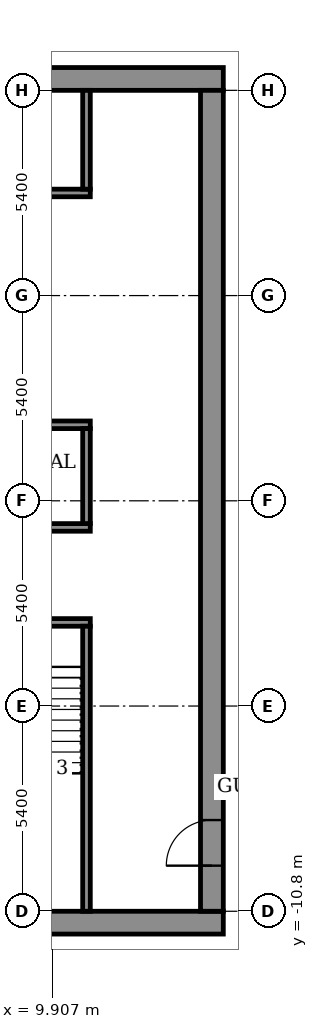
"""IFC4 building model, lengths in metres.
Left out: names, types, materials, properties, quantities, classifications, styles, units other than length and angle.
Written with IfcOpenShell. Run it as: python <this file> out.ifc"""

import sys

from ifc_helpers import new_model, si_unit, direction, frame, frame_2d, origin, place, context, subcontext, project, spatial, rectangle, extrude, element, fill, save


model = new_model("IFC4")
c1 = context("Model", 3, precision=1e-05, world=origin(), true_north=direction((0.0, 1.0)))
c2 = subcontext(c1, "Body", "Model", "MODEL_VIEW")
j1 = project(units=[si_unit("LENGTHUNIT", "METRE"), si_unit("PLANEANGLEUNIT", "RADIAN")], contexts=[c1])
p1 = place(None, origin())
s1 = spatial("IfcSite", under=j1, at=p1, CompositionType="ELEMENT")
p2 = place(p1, origin())
s2 = spatial("IfcBuilding", under=s1, at=p2, CompositionType="ELEMENT")
p3 = place(p2, frame((0.0, 0.0, 313.3)))
s3 = spatial("IfcBuildingStorey", under=s2, at=p3, CompositionType="ELEMENT", Elevation=313.3)
for number, where, z_axis, x_axis in (
    (1, (-14.4, -11.1, 0.0), (0.0, 0.0, 1.0), (1.0, 0.0, 0.0)),
    (2, (-14.4, 11.1, 0.0), (0.0, 0.0, 1.0), (1.0, 0.0, 0.0)),
):
    element("IfcWall", number, at=place(p3, frame(where, z_axis=z_axis, x_axis=x_axis)), inside=s3, PredefinedType="SHEAR", context=c2, shape_type="SweptSolid", body=[
        extrude(rectangle(XDim=28.8, YDim=0.6, at=frame_2d((14.4, 0.0))), origin(), (0.0, 0.0, 1.0), 3.6),
    ])
p4 = place(p3, frame((14.1, -10.8, 0.0), z_axis=(0.0, 0.0, 1.0), x_axis=(0.0, 1.0, 0.0)))
e3 = element("IfcWall", 3, at=p4, inside=s3, PredefinedType="SHEAR", context=c2, shape_type="SweptSolid", body=[
    extrude(rectangle(XDim=21.6, YDim=0.6, at=frame_2d((10.8, 0.0))), origin(), (0.0, 0.0, 1.0), 3.6),
])
p5 = place(p4, frame((1.2, 0.0, 0.0)))
e4 = element("IfcOpeningElement", 4, at=p5, cuts=e3, PredefinedType="OPENING", context=c2, shape_type="SweptSolid", body=[
    extrude(rectangle(XDim=1.2, YDim=2.1, at=frame_2d((0.6, 1.05))), frame((0.0, 0.31, 0.0), z_axis=(0.0, -1.0, 0.0), x_axis=(1.0, 0.0, 0.0)), (0.0, 0.0, 1.0), 0.62),
])
p6 = place(p3, frame((-10.9, -3.2, 0.0), z_axis=(0.0, 0.0, 1.0), x_axis=(1.0, 0.0, 0.0)))
e5 = element("IfcWall", 5, at=p6, inside=s3, PredefinedType="SHEAR", context=c2, shape_type="SweptSolid", body=[
    extrude(rectangle(XDim=21.8, YDim=0.2, at=frame_2d((10.9, 0.0))), origin(), (0.0, 0.0, 1.0), 3.05),
])
p7 = place(p6, frame((1.075, 0.0, 0.0)))
e6 = element("IfcOpeningElement", 6, at=p7, cuts=e5, PredefinedType="OPENING", context=c2, shape_type="SweptSolid", body=[
    extrude(rectangle(XDim=1.1, YDim=2.1, at=frame_2d((0.55, 1.05))), frame((0.0, 0.11, 0.0), z_axis=(0.0, -1.0, 0.0), x_axis=(1.0, 0.0, 0.0)), (0.0, 0.0, 1.0), 0.22),
])
p8 = place(p6, frame((10.325, 0.0, 0.0)))
e7 = element("IfcOpeningElement", 7, at=p8, cuts=e5, PredefinedType="OPENING", context=c2, shape_type="SweptSolid", body=[
    extrude(rectangle(XDim=1.1, YDim=2.1, at=frame_2d((0.55, 1.05))), frame((0.0, 0.11, 0.0), z_axis=(0.0, -1.0, 0.0), x_axis=(1.0, 0.0, 0.0)), (0.0, 0.0, 1.0), 0.22),
])
p9 = place(p6, frame((19.625, 0.0, 0.0)))
e8 = element("IfcOpeningElement", 8, at=p9, cuts=e5, PredefinedType="OPENING", context=c2, shape_type="SweptSolid", body=[
    extrude(rectangle(XDim=1.1, YDim=2.1, at=frame_2d((0.55, 1.05))), frame((0.0, 0.11, 0.0), z_axis=(0.0, -1.0, 0.0), x_axis=(1.0, 0.0, 0.0)), (0.0, 0.0, 1.0), 0.22),
])
p10 = place(p6, frame((5.7, 0.0, 0.0)))
e9 = element("IfcOpeningElement", 9, at=p10, cuts=e5, PredefinedType="OPENING", context=c2, shape_type="SweptSolid", body=[
    extrude(rectangle(XDim=1.1, YDim=2.1, at=frame_2d((0.55, 1.05))), frame((0.0, 0.11, 0.0), z_axis=(0.0, -1.0, 0.0), x_axis=(1.0, 0.0, 0.0)), (0.0, 0.0, 1.0), 0.22),
])
p11 = place(p6, frame((14.975, 0.0, 0.0)))
e10 = element("IfcOpeningElement", 10, at=p11, cuts=e5, PredefinedType="OPENING", context=c2, shape_type="SweptSolid", body=[
    extrude(rectangle(XDim=1.1, YDim=2.1, at=frame_2d((0.55, 1.05))), frame((0.0, 0.11, 0.0), z_axis=(0.0, -1.0, 0.0), x_axis=(1.0, 0.0, 0.0)), (0.0, 0.0, 1.0), 0.22),
])
p12 = place(p3, frame((-10.9, -0.7, 0.0), z_axis=(0.0, 0.0, 1.0), x_axis=(1.0, 0.0, 0.0)))
e11 = element("IfcWall", 11, at=p12, inside=s3, PredefinedType="SHEAR", context=c2, shape_type="SweptSolid", body=[
    extrude(rectangle(XDim=21.8, YDim=0.2, at=frame_2d((10.9, 0.0))), origin(), (0.0, 0.0, 1.0), 3.05),
])
p13 = place(p3, frame((-10.9, 2.0, 0.0), z_axis=(0.0, 0.0, 1.0), x_axis=(1.0, 0.0, 0.0)))
e12 = element("IfcWall", 12, at=p13, inside=s3, PredefinedType="SHEAR", context=c2, shape_type="SweptSolid", body=[
    extrude(rectangle(XDim=21.8, YDim=0.2, at=frame_2d((10.9, 0.0))), origin(), (0.0, 0.0, 1.0), 3.05),
])
p14 = place(p13, frame((4.95, 0.0, 0.0)))
e13 = element("IfcOpeningElement", 13, at=p14, cuts=e12, PredefinedType="OPENING", context=c2, shape_type="SweptSolid", body=[
    extrude(rectangle(XDim=1.1, YDim=2.1, at=frame_2d((0.55, 1.05))), frame((0.0, 0.11, 0.0), z_axis=(0.0, -1.0, 0.0), x_axis=(1.0, 0.0, 0.0)), (0.0, 0.0, 1.0), 0.22),
])
p15 = place(p13, frame((7.65, 0.0, 0.0)))
e14 = element("IfcOpeningElement", 14, at=p15, cuts=e12, PredefinedType="OPENING", context=c2, shape_type="SweptSolid", body=[
    extrude(rectangle(XDim=1.1, YDim=2.1, at=frame_2d((0.55, 1.05))), frame((0.0, 0.11, 0.0), z_axis=(0.0, -1.0, 0.0), x_axis=(1.0, 0.0, 0.0)), (0.0, 0.0, 1.0), 0.22),
])
p16 = place(p13, frame((10.35, 0.0, 0.0)))
e15 = element("IfcOpeningElement", 15, at=p16, cuts=e12, PredefinedType="OPENING", context=c2, shape_type="SweptSolid", body=[
    extrude(rectangle(XDim=1.1, YDim=2.1, at=frame_2d((0.55, 1.05))), frame((0.0, 0.11, 0.0), z_axis=(0.0, -1.0, 0.0), x_axis=(1.0, 0.0, 0.0)), (0.0, 0.0, 1.0), 0.22),
])
p17 = place(p13, frame((1.675, 0.0, 0.0)))
e16 = element("IfcOpeningElement", 16, at=p17, cuts=e12, PredefinedType="OPENING", context=c2, shape_type="SweptSolid", body=[
    extrude(rectangle(XDim=0.9, YDim=2.1, at=frame_2d((0.45, 1.05))), frame((0.0, 0.11, 0.0), z_axis=(0.0, -1.0, 0.0), x_axis=(1.0, 0.0, 0.0)), (0.0, 0.0, 1.0), 0.22),
])
p18 = place(p13, frame((14.5, 0.0, 0.0)))
e17 = element("IfcOpeningElement", 17, at=p18, cuts=e12, PredefinedType="OPENING", context=c2, shape_type="SweptSolid", body=[
    extrude(rectangle(XDim=0.9, YDim=2.1, at=frame_2d((0.45, 1.05))), frame((0.0, 0.11, 0.0), z_axis=(0.0, -1.0, 0.0), x_axis=(1.0, 0.0, 0.0)), (0.0, 0.0, 1.0), 0.22),
])
p19 = place(p13, frame((19.225, 0.0, 0.0)))
e18 = element("IfcOpeningElement", 18, at=p19, cuts=e12, PredefinedType="OPENING", context=c2, shape_type="SweptSolid", body=[
    extrude(rectangle(XDim=0.9, YDim=2.1, at=frame_2d((0.45, 1.05))), frame((0.0, 0.11, 0.0), z_axis=(0.0, -1.0, 0.0), x_axis=(1.0, 0.0, 0.0)), (0.0, 0.0, 1.0), 0.22),
])
p20 = place(p3, frame((-10.9, 8.1, 0.0), z_axis=(0.0, 0.0, 1.0), x_axis=(1.0, 0.0, 0.0)))
e19 = element("IfcWall", 19, at=p20, inside=s3, PredefinedType="SHEAR", context=c2, shape_type="SweptSolid", body=[
    extrude(rectangle(XDim=21.8, YDim=0.2, at=frame_2d((10.9, 0.0))), origin(), (0.0, 0.0, 1.0), 3.05),
])
p21 = place(p20, frame((4.95, 0.0, 0.0)))
e20 = element("IfcOpeningElement", 20, at=p21, cuts=e19, PredefinedType="OPENING", context=c2, shape_type="SweptSolid", body=[
    extrude(rectangle(XDim=1.1, YDim=2.1, at=frame_2d((0.55, 1.05))), frame((0.0, 0.11, 0.0), z_axis=(0.0, -1.0, 0.0), x_axis=(1.0, 0.0, 0.0)), (0.0, 0.0, 1.0), 0.22),
])
p22 = place(p20, frame((7.65, 0.0, 0.0)))
e21 = element("IfcOpeningElement", 21, at=p22, cuts=e19, PredefinedType="OPENING", context=c2, shape_type="SweptSolid", body=[
    extrude(rectangle(XDim=1.1, YDim=2.1, at=frame_2d((0.55, 1.05))), frame((0.0, 0.11, 0.0), z_axis=(0.0, -1.0, 0.0), x_axis=(1.0, 0.0, 0.0)), (0.0, 0.0, 1.0), 0.22),
])
p23 = place(p20, frame((10.35, 0.0, 0.0)))
e22 = element("IfcOpeningElement", 22, at=p23, cuts=e19, PredefinedType="OPENING", context=c2, shape_type="SweptSolid", body=[
    extrude(rectangle(XDim=1.1, YDim=2.1, at=frame_2d((0.55, 1.05))), frame((0.0, 0.11, 0.0), z_axis=(0.0, -1.0, 0.0), x_axis=(1.0, 0.0, 0.0)), (0.0, 0.0, 1.0), 0.22),
])
p24 = place(p20, frame((1.675, 0.0, 0.0)))
e23 = element("IfcOpeningElement", 23, at=p24, cuts=e19, PredefinedType="OPENING", context=c2, shape_type="SweptSolid", body=[
    extrude(rectangle(XDim=0.9, YDim=2.1, at=frame_2d((0.45, 1.05))), frame((0.0, 0.11, 0.0), z_axis=(0.0, -1.0, 0.0), x_axis=(1.0, 0.0, 0.0)), (0.0, 0.0, 1.0), 0.22),
])
p25 = place(p20, frame((14.5, 0.0, 0.0)))
e24 = element("IfcOpeningElement", 24, at=p25, cuts=e19, PredefinedType="OPENING", context=c2, shape_type="SweptSolid", body=[
    extrude(rectangle(XDim=0.9, YDim=2.1, at=frame_2d((0.45, 1.05))), frame((0.0, 0.11, 0.0), z_axis=(0.0, -1.0, 0.0), x_axis=(1.0, 0.0, 0.0)), (0.0, 0.0, 1.0), 0.22),
])
p26 = place(p20, frame((19.225, 0.0, 0.0)))
e25 = element("IfcOpeningElement", 25, at=p26, cuts=e19, PredefinedType="OPENING", context=c2, shape_type="SweptSolid", body=[
    extrude(rectangle(XDim=0.9, YDim=2.1, at=frame_2d((0.45, 1.05))), frame((0.0, 0.11, 0.0), z_axis=(0.0, -1.0, 0.0), x_axis=(1.0, 0.0, 0.0)), (0.0, 0.0, 1.0), 0.22),
])
p27 = place(p3, frame((10.8, -10.8, 0.0), z_axis=(0.0, 0.0, 1.0), x_axis=(0.0, 1.0, 0.0)))
e26 = element("IfcWall", 26, at=p27, inside=s3, PredefinedType="SHEAR", context=c2, shape_type="SweptSolid", body=[
    extrude(rectangle(XDim=7.5, YDim=0.2, at=frame_2d((3.75, 0.0))), origin(), (0.0, 0.0, 1.0), 3.05),
])
p28 = place(p3, frame((10.8, -0.6, 0.0), z_axis=(0.0, 0.0, 1.0), x_axis=(0.0, 1.0, 0.0)))
e27 = element("IfcWall", 27, at=p28, inside=s3, PredefinedType="STANDARD", context=c2, shape_type="SweptSolid", body=[
    extrude(rectangle(XDim=2.5, YDim=0.2, at=frame_2d((1.25, 0.0))), origin(), (0.0, 0.0, 1.0), 3.05),
])
p29 = place(p3, frame((10.8, 8.2, 0.0), z_axis=(0.0, 0.0, 1.0), x_axis=(0.0, 1.0, 0.0)))
e28 = element("IfcWall", 28, at=p29, inside=s3, PredefinedType="STANDARD", context=c2, shape_type="SweptSolid", body=[
    extrude(rectangle(XDim=2.6, YDim=0.2, at=frame_2d((1.3, 0.0))), origin(), (0.0, 0.0, 1.0), 3.05),
])
p30 = place(p5, origin())
e29 = element("IfcDoor", 29, at=p30, inside=s3, OperationType="DOUBLE_DOOR_SINGLE_SWING", PredefinedType="DOOR", context=c2, shape_type="SweptSolid", body=[
    extrude(rectangle(XDim=1.2, YDim=2.1, at=frame_2d((0.6, 1.05))), frame((0.0, 0.025, 0.0), z_axis=(0.0, -1.0, 0.0), x_axis=(1.0, 0.0, 0.0)), (0.0, 0.0, 1.0), 0.05),
])
fill(e4, e29)
save(model, sys.argv[1])
